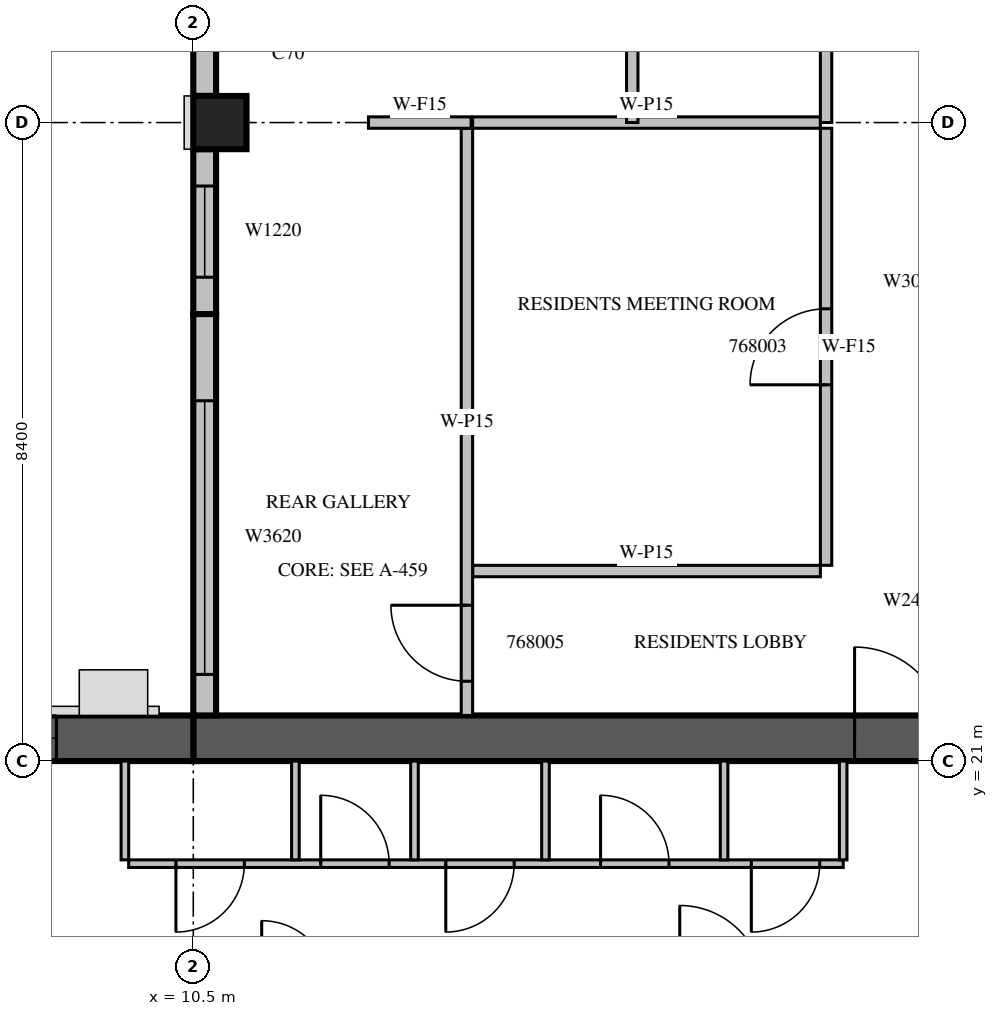
"""IFC4 building model, lengths in metres.
Left out: names, types, materials, properties, quantities, classifications, styles, units other than length and angle.
Written with IfcOpenShell. Run it as: python <this file> out.ifc"""

import sys

from ifc_helpers import new_model, si_unit, direction, frame, frame_2d, origin, origin_2d, place, context, subcontext, project, spatial, rectangle, extrude, source, transform, mapped, element, fill, save


model = new_model("IFC4")
c1 = context("Model", 3, precision=1e-05, world=origin(), true_north=direction((0.0, 1.0)))
c2 = subcontext(c1, "Body", "Model", "MODEL_VIEW")
j1 = project(units=[si_unit("LENGTHUNIT", "METRE"), si_unit("PLANEANGLEUNIT", "RADIAN")], contexts=[c1])
p1 = place(None, origin())
s1 = spatial("IfcSite", under=j1, at=p1, CompositionType="ELEMENT")
p2 = place(p1, origin())
s2 = spatial("IfcBuilding", under=s1, at=p2, CompositionType="ELEMENT")
p3 = place(p2, frame((0.0, 0.0, 298.5)))
s3 = spatial("IfcBuildingStorey", under=s2, at=p3, CompositionType="ELEMENT", Elevation=298.5)
m1 = source(origin(), c2, "Body", "SweptSolid", [
    extrude(rectangle(XDim=0.7, YDim=0.7, at=origin_2d()), origin(), (0.0, 0.0, 1.0), 3.5),
])
p4 = place(p3, frame((10.85, 29.4, 0.0), z_axis=(0.0, 0.0, 1.0), x_axis=(1.0, 0.0, 0.0)))
e1 = element("IfcColumn", 1, at=p4, inside=s3, PredefinedType="COLUMN", context=c2, shape_type="MappedRepresentation", body=[
    mapped(m1, transform((0.0, 0.0, 0.0), scale=1.0)),
])
m2 = source(origin(), c2, "Body", "SweptSolid", [
    extrude(rectangle(XDim=11.1, YDim=0.6, at=frame_2d((5.55, 0.0))), origin(), (0.0, 0.0, 1.0), 3.5),
])
p5 = place(p3, frame((10.5, 21.3, 0.0), z_axis=(0.0, 0.0, 1.0), x_axis=(1.0, 0.0, 0.0)))
e2 = element("IfcWall", 2, at=p5, inside=s3, PredefinedType="SHEAR", context=c2, shape_type="MappedRepresentation", body=[
    mapped(m2, transform((0.0, 0.0, 0.0), scale=1.0)),
])
m3 = source(origin(), c2, "Body", "SweptSolid", [
    extrude(rectangle(XDim=1.2, YDim=2.1, at=frame_2d((0.6, 1.05))), frame((0.0, 0.31, 0.0), z_axis=(0.0, -1.0, 0.0), x_axis=(1.0, 0.0, 0.0)), (0.0, 0.0, 1.0), 0.62),
])
p6 = place(p5, frame((8.7, 0.0, 0.0)))
e3 = element("IfcOpeningElement", 3, at=p6, cuts=e2, PredefinedType="OPENING", context=c2, shape_type="MappedRepresentation", body=[
    mapped(m3, transform((0.0, 0.0, 0.0), scale=1.0)),
])
m4 = source(origin(), c2, "Body", "SweptSolid", [
    extrude(rectangle(XDim=6.6, YDim=0.6, at=frame_2d((3.3, 0.0))), origin(), (0.0, 0.0, 1.0), 3.5),
])
p7 = place(p3, frame((3.9, 21.3, 0.0), z_axis=(0.0, 0.0, 1.0), x_axis=(1.0, 0.0, 0.0)))
e4 = element("IfcWall", 4, at=p7, inside=s3, PredefinedType="SHEAR", context=c2, shape_type="MappedRepresentation", body=[
    mapped(m4, transform((0.0, 0.0, 0.0), scale=1.0)),
])
m5 = source(origin(), c2, "Body", "SweptSolid", [
    extrude(rectangle(XDim=1.2, YDim=2.4, at=frame_2d((0.6, 1.2))), frame((0.0, 0.31, 0.0), z_axis=(0.0, -1.0, 0.0), x_axis=(1.0, 0.0, 0.0)), (0.0, 0.0, 1.0), 0.62),
])
p8 = place(p7, frame((1.5, 0.0, 0.6)))
e5 = element("IfcOpeningElement", 5, at=p8, cuts=e4, PredefinedType="OPENING", context=c2, shape_type="MappedRepresentation", body=[
    mapped(m5, transform((0.0, 0.0, 0.0), scale=1.0)),
])
p9 = place(p7, frame((3.6, 0.0, 0.6)))
e6 = element("IfcOpeningElement", 6, at=p9, cuts=e4, PredefinedType="OPENING", context=c2, shape_type="MappedRepresentation", body=[
    mapped(m5, transform((0.0, 0.0, 0.0), scale=1.0)),
])
m6 = source(origin(), c2, "Body", "SweptSolid", [
    extrude(rectangle(XDim=1.33, YDim=0.3, at=frame_2d((0.665, 0.0))), origin(), (0.0, 0.0, 1.0), 3.1),
])
p10 = place(p3, frame((10.65, 31.08, 0.0), z_axis=(0.0, 0.0, 1.0), x_axis=(0.0, -1.0, 0.0)))
e7 = element("IfcWall", 7, at=p10, inside=s3, PredefinedType="STANDARD", context=c2, shape_type="MappedRepresentation", body=[
    mapped(m6, transform((0.0, 0.0, 0.0), scale=1.0)),
])
m7 = source(origin(), c2, "Body", "SweptSolid", [
    extrude(rectangle(XDim=2.17, YDim=0.3, at=frame_2d((1.085, 0.0))), origin(), (0.0, 0.0, 1.0), 3.1),
])
p11 = place(p3, frame((10.65, 29.05, 0.0), z_axis=(0.0, 0.0, 1.0), x_axis=(0.0, -1.0, 0.0)))
e8 = element("IfcWall", 8, at=p11, inside=s3, PredefinedType="STANDARD", context=c2, shape_type="MappedRepresentation", body=[
    mapped(m7, transform((0.0, 0.0, 0.0), scale=1.0)),
])
m8 = source(origin(), c2, "Body", "SweptSolid", [
    extrude(rectangle(XDim=1.2, YDim=2.0, at=frame_2d((0.6, 1.0))), frame((0.0, 0.16, 0.0), z_axis=(0.0, -1.0, 0.0), x_axis=(1.0, 0.0, 0.0)), (0.0, 0.0, 1.0), 0.32),
])
p12 = place(p11, frame((0.485, 0.0, 0.6)))
e9 = element("IfcOpeningElement", 9, at=p12, cuts=e8, PredefinedType="OPENING", context=c2, shape_type="MappedRepresentation", body=[
    mapped(m8, transform((0.0, 0.0, 0.0), scale=1.0)),
])
m9 = source(origin(), c2, "Body", "SweptSolid", [
    extrude(rectangle(XDim=5.28, YDim=0.3, at=frame_2d((2.64, 0.0))), origin(), (0.0, 0.0, 1.0), 3.1),
])
p13 = place(p3, frame((10.65, 26.88, 0.0), z_axis=(0.0, 0.0, 1.0), x_axis=(0.0, -1.0, 0.0)))
e10 = element("IfcWall", 10, at=p13, inside=s3, PredefinedType="STANDARD", context=c2, shape_type="MappedRepresentation", body=[
    mapped(m9, transform((0.0, 0.0, 0.0), scale=1.0)),
])
m10 = source(origin(), c2, "Body", "SweptSolid", [
    extrude(rectangle(XDim=3.6, YDim=2.0, at=frame_2d((1.8, 1.0))), frame((0.0, 0.16, 0.0), z_axis=(0.0, -1.0, 0.0), x_axis=(1.0, 0.0, 0.0)), (0.0, 0.0, 1.0), 0.32),
])
p14 = place(p13, frame((1.14, 0.0, 0.6)))
e11 = element("IfcOpeningElement", 11, at=p14, cuts=e10, PredefinedType="OPENING", context=c2, shape_type="MappedRepresentation", body=[
    mapped(m10, transform((0.0, 0.0, 0.0), scale=1.0)),
])
m11 = source(origin(), c2, "Body", "SweptSolid", [
    extrude(rectangle(XDim=9.4, YDim=0.1, at=frame_2d((4.7, 0.0))), origin(), (0.0, 0.0, 1.0), 3.1),
])
p15 = place(p3, frame((9.65, 19.65, 0.0), z_axis=(0.0, 0.0, 1.0), x_axis=(1.0, 0.0, 0.0)))
e12 = element("IfcWall", 12, at=p15, inside=s3, PredefinedType="PARTITIONING", context=c2, shape_type="MappedRepresentation", body=[
    mapped(m11, transform((0.0, 0.0, 0.0), scale=1.0)),
])
m12 = source(origin(), c2, "Body", "SweptSolid", [
    extrude(rectangle(XDim=0.9, YDim=2.1, at=frame_2d((0.45, 1.05))), frame((0.0, 0.06, 0.0), z_axis=(0.0, -1.0, 0.0), x_axis=(1.0, 0.0, 0.0)), (0.0, 0.0, 1.0), 0.12),
])
p16 = place(p15, frame((0.622, 0.0, 0.0)))
e13 = element("IfcOpeningElement", 13, at=p16, cuts=e12, PredefinedType="OPENING", context=c2, shape_type="MappedRepresentation", body=[
    mapped(m12, transform((0.0, 0.0, 0.0), scale=1.0)),
])
p17 = place(p15, frame((2.527, 0.0, 0.0)))
e14 = element("IfcOpeningElement", 14, at=p17, cuts=e12, PredefinedType="OPENING", context=c2, shape_type="MappedRepresentation", body=[
    mapped(m12, transform((0.0, 0.0, 0.0), scale=1.0)),
])
p18 = place(p15, frame((4.172, 0.0, 0.0)))
e15 = element("IfcOpeningElement", 15, at=p18, cuts=e12, PredefinedType="OPENING", context=c2, shape_type="MappedRepresentation", body=[
    mapped(m12, transform((0.0, 0.0, 0.0), scale=1.0)),
])
p19 = place(p15, frame((6.208, 0.0, 0.0)))
e16 = element("IfcOpeningElement", 16, at=p19, cuts=e12, PredefinedType="OPENING", context=c2, shape_type="MappedRepresentation", body=[
    mapped(m12, transform((0.0, 0.0, 0.0), scale=1.0)),
])
p20 = place(p15, frame((8.192, 0.0, 0.0)))
e17 = element("IfcOpeningElement", 17, at=p20, cuts=e12, PredefinedType="OPENING", context=c2, shape_type="MappedRepresentation", body=[
    mapped(m12, transform((0.0, 0.0, 0.0), scale=1.0)),
])
m13 = source(origin(), c2, "Body", "SweptSolid", [
    extrude(rectangle(XDim=1.3, YDim=0.1, at=frame_2d((0.65, 0.0))), origin(), (0.0, 0.0, 1.0), 3.1),
])
for number, where, z_axis, x_axis in (
    (18, (11.843, 19.7, 0.0), (0.0, 0.0, 1.0), (0.0, 1.0, 0.0)),
    (19, (13.41, 19.7, 0.0), (0.0, 0.0, 1.0), (0.0, 1.0, 0.0)),
    (20, (15.133, 19.7, 0.0), (0.0, 0.0, 1.0), (0.0, 1.0, 0.0)),
    (21, (17.483, 19.7, 0.0), (0.0, 0.0, 1.0), (0.0, 1.0, 0.0)),
    (22, (9.6, 19.7, 0.0), (0.0, 0.0, 1.0), (0.0, 1.0, 0.0)),
    (23, (19.05, 19.7, 0.0), (0.0, 0.0, 1.0), (0.0, 1.0, 0.0)),
):
    element("IfcWall", number, at=place(p3, frame(where, z_axis=z_axis, x_axis=x_axis)), inside=s3, PredefinedType="PARTITIONING", context=c2, shape_type="MappedRepresentation", body=[
        mapped(m13, transform((0.0, 0.0, 0.0), scale=1.0)),
    ])
m14 = source(origin(), c2, "Body", "SweptSolid", [
    extrude(rectangle(XDim=4.575, YDim=0.15, at=frame_2d((2.288, 0.0))), origin(), (0.0, 0.0, 1.0), 3.1),
])
for number, where, z_axis, x_axis in (
    (24, (14.175, 23.5, 0.0), (0.0, 0.0, 1.0), (1.0, 0.0, 0.0)),
    (25, (18.75, 29.4, 0.0), (0.0, 0.0, 1.0), (-1.0, 0.0, 0.0)),
):
    element("IfcWall", number, at=place(p3, frame(where, z_axis=z_axis, x_axis=x_axis)), inside=s3, PredefinedType="PARTITIONING", context=c2, shape_type="MappedRepresentation", body=[
        mapped(m14, transform((0.0, 0.0, 0.0), scale=1.0)),
    ])
m15 = source(origin(), c2, "Body", "SweptSolid", [
    extrude(rectangle(XDim=5.75, YDim=0.15, at=frame_2d((2.875, 0.0))), origin(), (0.0, 0.0, 1.0), 3.1),
])
p21 = place(p3, frame((18.825, 23.575, 0.0), z_axis=(0.0, 0.0, 1.0), x_axis=(0.0, 1.0, 0.0)))
e26 = element("IfcWall", 26, at=p21, inside=s3, PredefinedType="PARTITIONING", context=c2, shape_type="MappedRepresentation", body=[
    mapped(m15, transform((0.0, 0.0, 0.0), scale=1.0)),
])
m16 = source(origin(), c2, "Body", "SweptSolid", [
    extrude(rectangle(XDim=1.0, YDim=2.1, at=frame_2d((0.5, 1.05))), frame((0.0, 0.085, 0.0), z_axis=(0.0, -1.0, 0.0), x_axis=(1.0, 0.0, 0.0)), (0.0, 0.0, 1.0), 0.17),
])
p22 = place(p21, frame((2.375, 0.0, 0.0)))
e27 = element("IfcOpeningElement", 27, at=p22, cuts=e26, PredefinedType="OPENING", context=c2, shape_type="MappedRepresentation", body=[
    mapped(m16, transform((0.0, 0.0, 0.0), scale=1.0)),
])
m17 = source(origin(), c2, "Body", "SweptSolid", [
    extrude(rectangle(XDim=7.725, YDim=0.15, at=frame_2d((3.862, 0.0))), origin(), (0.0, 0.0, 1.0), 3.1),
])
p23 = place(p3, frame((14.1, 29.325, 0.0), z_axis=(0.0, 0.0, 1.0), x_axis=(0.0, -1.0, 0.0)))
e28 = element("IfcWall", 28, at=p23, inside=s3, PredefinedType="PARTITIONING", context=c2, shape_type="MappedRepresentation", body=[
    mapped(m17, transform((0.0, 0.0, 0.0), scale=1.0)),
])
p24 = place(p23, frame((6.275, 0.0, 0.0)))
e29 = element("IfcOpeningElement", 29, at=p24, cuts=e28, PredefinedType="OPENING", context=c2, shape_type="MappedRepresentation", body=[
    mapped(m16, transform((0.0, 0.0, 0.0), scale=1.0)),
])
m18 = source(origin(), c2, "Body", "SweptSolid", [
    extrude(rectangle(XDim=1.35, YDim=0.15, at=frame_2d((0.675, 0.0))), origin(), (0.0, 0.0, 1.0), 3.1),
])
p25 = place(p3, frame((14.155, 29.4, 0.0), z_axis=(0.0, 0.0, 1.0), x_axis=(-1.0, 0.0, 0.0)))
e30 = element("IfcWall", 30, at=p25, inside=s3, PredefinedType="PARTITIONING", context=c2, shape_type="MappedRepresentation", body=[
    mapped(m18, transform((0.0, 0.0, 0.0), scale=1.0)),
])
m19 = source(origin(), c2, "Body", "SweptSolid", [
    extrude(rectangle(XDim=8.4, YDim=0.15, at=frame_2d((4.2, 0.0))), origin(), (0.0, 0.0, 1.0), 3.1),
])
p26 = place(p3, frame((16.275, 29.4, 0.0), z_axis=(0.0, 0.0, 1.0), x_axis=(0.0, 1.0, 0.0)))
e31 = element("IfcWall", 31, at=p26, inside=s3, PredefinedType="PARTITIONING", context=c2, shape_type="MappedRepresentation", body=[
    mapped(m19, transform((0.0, 0.0, 0.0), scale=1.0)),
])
m20 = source(origin(), c2, "Body", "SweptSolid", [
    extrude(rectangle(XDim=1.2, YDim=2.1, at=frame_2d((0.6, 1.05))), frame((0.0, 0.085, 0.0), z_axis=(0.0, -1.0, 0.0), x_axis=(1.0, 0.0, 0.0)), (0.0, 0.0, 1.0), 0.17),
])
p27 = place(p26, frame((2.524, 0.0, 0.0)))
e32 = element("IfcOpeningElement", 32, at=p27, cuts=e31, PredefinedType="OPENING", context=c2, shape_type="MappedRepresentation", body=[
    mapped(m20, transform((0.0, 0.0, 0.0), scale=1.0)),
])
p28 = place(p3, frame((18.825, 29.4, 0.0), z_axis=(0.0, 0.0, 1.0), x_axis=(0.0, 1.0, 0.0)))
e33 = element("IfcWall", 33, at=p28, inside=s3, PredefinedType="PARTITIONING", context=c2, shape_type="MappedRepresentation", body=[
    mapped(m19, transform((0.0, 0.0, 0.0), scale=1.0)),
])
p29 = place(p28, frame((2.474, 0.0, 0.0)))
e34 = element("IfcOpeningElement", 34, at=p29, cuts=e33, PredefinedType="OPENING", context=c2, shape_type="MappedRepresentation", body=[
    mapped(m20, transform((0.0, 0.0, 0.0), scale=1.0)),
])
m21 = source(origin(), c2, "Body", "SweptSolid", [
    extrude(rectangle(XDim=0.9, YDim=2.1, at=frame_2d((0.45, 1.05))), frame((0.0, 0.085, 0.0), z_axis=(0.0, -1.0, 0.0), x_axis=(1.0, 0.0, 0.0)), (0.0, 0.0, 1.0), 0.17),
])
p30 = place(p28, frame((6.824, 0.0, 0.0)))
e35 = element("IfcOpeningElement", 35, at=p30, cuts=e33, PredefinedType="OPENING", context=c2, shape_type="MappedRepresentation", body=[
    mapped(m21, transform((0.0, 0.0, 0.0), scale=1.0)),
])
m22 = source(origin(), c2, "Body", "SweptSolid", [
    extrude(rectangle(XDim=1.2, YDim=2.0, at=frame_2d((0.6, 1.0))), frame((0.0, 0.03, 0.0), z_axis=(0.0, -1.0, 0.0), x_axis=(1.0, 0.0, 0.0)), (0.0, 0.0, 1.0), 0.06),
])
p31 = place(p12, origin())
e36 = element("IfcWindow", 36, at=p31, inside=s3, PartitioningType="SINGLE_PANEL", PredefinedType="WINDOW", context=c2, shape_type="MappedRepresentation", body=[
    mapped(m22, transform((0.0, 0.0, 0.0), scale=1.0)),
])
fill(e9, e36)
m23 = source(origin(), c2, "Body", "SweptSolid", [
    extrude(rectangle(XDim=3.6, YDim=2.0, at=frame_2d((1.8, 1.0))), frame((0.0, 0.03, 0.0), z_axis=(0.0, -1.0, 0.0), x_axis=(1.0, 0.0, 0.0)), (0.0, 0.0, 1.0), 0.06),
])
p32 = place(p14, origin())
e37 = element("IfcWindow", 37, at=p32, inside=s3, PartitioningType="SINGLE_PANEL", PredefinedType="WINDOW", context=c2, shape_type="MappedRepresentation", body=[
    mapped(m23, transform((0.0, 0.0, 0.0), scale=1.0)),
])
fill(e11, e37)
m24 = source(origin(), c2, "Body", "SweptSolid", [
    extrude(rectangle(XDim=0.9, YDim=2.1, at=frame_2d((0.45, 1.05))), frame((0.0, 0.025, 0.0), z_axis=(0.0, -1.0, 0.0), x_axis=(1.0, 0.0, 0.0)), (0.0, 0.0, 1.0), 0.05),
])
p33 = place(p16, origin())
e38 = element("IfcDoor", 38, at=p33, inside=s3, OperationType="SINGLE_SWING_RIGHT", PredefinedType="DOOR", context=c2, shape_type="MappedRepresentation", body=[
    mapped(m24, transform((0.0, 0.0, 0.0), scale=1.0)),
])
fill(e13, e38)
p34 = place(p17, origin())
e39 = element("IfcDoor", 39, at=p34, inside=s3, OperationType="SINGLE_SWING_LEFT", PredefinedType="DOOR", context=c2, shape_type="MappedRepresentation", body=[
    mapped(m24, transform((0.0, 0.0, 0.0), scale=1.0)),
])
fill(e14, e39)
p35 = place(p18, origin())
e40 = element("IfcDoor", 40, at=p35, inside=s3, OperationType="SINGLE_SWING_RIGHT", PredefinedType="DOOR", context=c2, shape_type="MappedRepresentation", body=[
    mapped(m24, transform((0.0, 0.0, 0.0), scale=1.0)),
])
fill(e15, e40)
p36 = place(p19, origin())
e41 = element("IfcDoor", 41, at=p36, inside=s3, OperationType="SINGLE_SWING_LEFT", PredefinedType="DOOR", context=c2, shape_type="MappedRepresentation", body=[
    mapped(m24, transform((0.0, 0.0, 0.0), scale=1.0)),
])
fill(e16, e41)
p37 = place(p20, origin())
e42 = element("IfcDoor", 42, at=p37, inside=s3, OperationType="SINGLE_SWING_RIGHT", PredefinedType="DOOR", context=c2, shape_type="MappedRepresentation", body=[
    mapped(m24, transform((0.0, 0.0, 0.0), scale=1.0)),
])
fill(e17, e42)
m25 = source(origin(), c2, "Body", "SweptSolid", [
    extrude(rectangle(XDim=1.2, YDim=2.1, at=frame_2d((0.6, 1.05))), frame((0.0, 0.025, 0.0), z_axis=(0.0, -1.0, 0.0), x_axis=(1.0, 0.0, 0.0)), (0.0, 0.0, 1.0), 0.05),
])
p38 = place(p6, origin())
e43 = element("IfcDoor", 43, at=p38, inside=s3, OperationType="SINGLE_SWING_LEFT", PredefinedType="DOOR", context=c2, shape_type="MappedRepresentation", body=[
    mapped(m25, transform((0.0, 0.0, 0.0), scale=1.0)),
])
fill(e3, e43)
m26 = source(origin(), c2, "Body", "SweptSolid", [
    extrude(rectangle(XDim=1.2, YDim=2.4, at=frame_2d((0.6, 1.2))), frame((0.0, 0.03, 0.0), z_axis=(0.0, -1.0, 0.0), x_axis=(1.0, 0.0, 0.0)), (0.0, 0.0, 1.0), 0.06),
])
p39 = place(p9, origin())
e44 = element("IfcWindow", 44, at=p39, inside=s3, PartitioningType="SINGLE_PANEL", PredefinedType="WINDOW", context=c2, shape_type="MappedRepresentation", body=[
    mapped(m26, transform((0.0, 0.0, 0.0), scale=1.0)),
])
fill(e6, e44)
m27 = source(origin(), c2, "Body", "SweptSolid", [
    extrude(rectangle(XDim=1.0, YDim=2.1, at=frame_2d((0.5, 1.05))), frame((0.0, 0.025, 0.0), z_axis=(0.0, -1.0, 0.0), x_axis=(1.0, 0.0, 0.0)), (0.0, 0.0, 1.0), 0.05),
])
p40 = place(p22, origin())
e45 = element("IfcDoor", 45, at=p40, inside=s3, OperationType="SINGLE_SWING_LEFT", PredefinedType="DOOR", context=c2, shape_type="MappedRepresentation", body=[
    mapped(m27, transform((0.0, 0.0, 0.0), scale=1.0)),
])
fill(e27, e45)
p41 = place(p24, origin())
e46 = element("IfcDoor", 46, at=p41, inside=s3, OperationType="SINGLE_SWING_RIGHT", PredefinedType="DOOR", context=c2, shape_type="MappedRepresentation", body=[
    mapped(m27, transform((0.0, 0.0, 0.0), scale=1.0)),
])
fill(e29, e46)
save(model, sys.argv[1])
